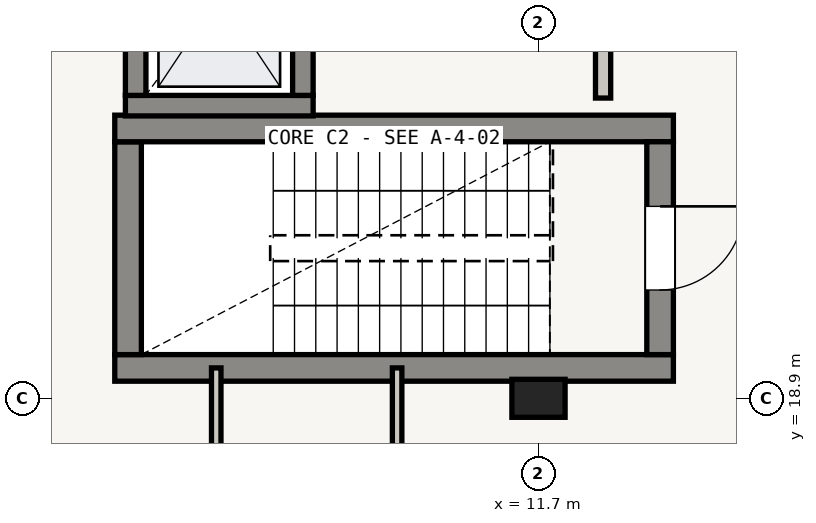
"""IFC4 building model, lengths in metres.
Left out: names, types, materials, properties, quantities, classifications, styles, units other than length and angle.
Written with IfcOpenShell. Run it as: python <this file> out.ifc"""

import sys

from ifc_helpers import new_model, si_unit, direction, frame, frame_2d, origin, origin_2d, place, context, subcontext, project, spatial, rectangle, extrude, element, fill, save


model = new_model("IFC4")
c1 = context("Model", 3, precision=1e-05, world=origin(), true_north=direction((0.0, 1.0)))
c2 = subcontext(c1, "Body", "Model", "MODEL_VIEW")
j1 = project(units=[si_unit("LENGTHUNIT", "METRE"), si_unit("PLANEANGLEUNIT", "RADIAN")], contexts=[c1])
p1 = place(None, origin())
s1 = spatial("IfcSite", under=j1, at=p1, CompositionType="ELEMENT")
p2 = place(p1, origin())
s2 = spatial("IfcBuilding", under=s1, at=p2, CompositionType="ELEMENT")
p3 = place(p2, frame((0.0, 0.0, 17.1)))
s3 = spatial("IfcBuildingStorey", under=s2, at=p3, CompositionType="ELEMENT", Elevation=17.1)
p4 = place(p3, frame((11.7, 18.9, 0.0), z_axis=(0.0, 0.0, 1.0), x_axis=(1.0, 0.0, 0.0)))
e1 = element("IfcColumn", 1, at=p4, inside=s3, PredefinedType="COLUMN", context=c2, shape_type="SweptSolid", body=[
    extrude(rectangle(XDim=0.7, YDim=0.5, at=origin_2d()), origin(), (0.0, 0.0, 1.0), 3.77),
])
p5 = place(p3, frame((13.475, 19.3, 0.0), z_axis=(0.0, 0.0, 1.0), x_axis=(-1.0, 0.0, 0.0)))
e2 = element("IfcWall", 2, at=p5, inside=s3, PredefinedType="SHEAR", context=c2, shape_type="SweptSolid", body=[
    extrude(rectangle(XDim=7.35, YDim=0.35, at=frame_2d((3.675, 0.0))), origin(), (0.0, 0.0, 1.0), 3.77),
])
p6 = place(p3, frame((6.3, 19.475, 0.0), z_axis=(0.0, 0.0, 1.0), x_axis=(0.0, 1.0, 0.0)))
e3 = element("IfcWall", 3, at=p6, inside=s3, PredefinedType="SHEAR", context=c2, shape_type="SweptSolid", body=[
    extrude(rectangle(XDim=2.8, YDim=0.35, at=frame_2d((1.4, 0.0))), origin(), (0.0, 0.0, 1.0), 3.77),
])
p7 = place(p3, frame((6.125, 22.45, 0.0), z_axis=(0.0, 0.0, 1.0), x_axis=(1.0, 0.0, 0.0)))
e4 = element("IfcWall", 4, at=p7, inside=s3, PredefinedType="SHEAR", context=c2, shape_type="SweptSolid", body=[
    extrude(rectangle(XDim=7.35, YDim=0.35, at=frame_2d((3.675, 0.0))), origin(), (0.0, 0.0, 1.0), 3.77),
])
p8 = place(p3, frame((13.3, 22.275, 0.0), z_axis=(0.0, 0.0, 1.0), x_axis=(0.0, -1.0, 0.0)))
e5 = element("IfcWall", 5, at=p8, inside=s3, PredefinedType="SHEAR", context=c2, shape_type="SweptSolid", body=[
    extrude(rectangle(XDim=2.8, YDim=0.35, at=frame_2d((1.4, 0.0))), origin(), (0.0, 0.0, 1.0), 3.77),
])
p9 = place(p8, frame((0.85, 0.0, 0.0)))
e6 = element("IfcOpeningElement", 6, at=p9, cuts=e5, PredefinedType="OPENING", context=c2, shape_type="SweptSolid", body=[
    extrude(rectangle(XDim=1.1, YDim=2.05, at=frame_2d((0.55, 1.025))), frame((0.0, 0.175, 0.0), z_axis=(0.0, -1.0, 0.0), x_axis=(1.0, 0.0, 0.0)), (0.0, 0.0, 1.0), 0.35),
])
p10 = place(p3, frame((8.735, 22.75, 0.0), z_axis=(0.0, 0.0, 1.0), x_axis=(-1.0, 0.0, 0.0)))
e7 = element("IfcWall", 7, at=p10, inside=s3, PredefinedType="SHEAR", context=c2, shape_type="SweptSolid", body=[
    extrude(rectangle(XDim=2.47, YDim=0.27, at=frame_2d((1.235, 0.0))), origin(), (0.0, 0.0, 1.0), 3.77),
])
p11 = place(p3, frame((6.4, 22.885, 0.0), z_axis=(0.0, 0.0, 1.0), x_axis=(0.0, 1.0, 0.0)))
e8 = element("IfcWall", 8, at=p11, inside=s3, PredefinedType="SHEAR", context=c2, shape_type="SweptSolid", body=[
    extrude(rectangle(XDim=2.63, YDim=0.27, at=frame_2d((1.315, 0.0))), origin(), (0.0, 0.0, 1.0), 3.77),
])
p12 = place(p3, frame((8.6, 25.515, 0.0), z_axis=(0.0, 0.0, 1.0), x_axis=(0.0, -1.0, 0.0)))
e9 = element("IfcWall", 9, at=p12, inside=s3, PredefinedType="SHEAR", context=c2, shape_type="SweptSolid", body=[
    extrude(rectangle(XDim=2.63, YDim=0.27, at=frame_2d((1.315, 0.0))), origin(), (0.0, 0.0, 1.0), 3.77),
])
p13 = place(p12, frame((0.755, 0.0, 0.0)))
e10 = element("IfcOpeningElement", 10, at=p13, cuts=e9, PredefinedType="OPENING", context=c2, shape_type="SweptSolid", body=[
    extrude(rectangle(XDim=1.12, YDim=2.1, at=frame_2d((0.56, 1.05))), frame((0.0, 0.135, 0.0), z_axis=(0.0, -1.0, 0.0), x_axis=(1.0, 0.0, 0.0)), (0.0, 0.0, 1.0), 0.27),
])
p14 = place(p3, frame((12.55, 25.75, 0.0), z_axis=(0.0, 0.0, 1.0), x_axis=(0.0, -1.0, 0.0)))
e11 = element("IfcWall", 11, at=p14, inside=s3, PredefinedType="SOLIDWALL", context=c2, shape_type="SweptSolid", body=[
    extrude(rectangle(XDim=2.9, YDim=0.2, at=frame_2d((1.45, 0.0))), origin(), (0.0, 0.0, 1.0), 2.79),
])
p15 = place(p14, frame((0.875, 0.0, 0.0)))
e12 = element("IfcOpeningElement", 12, at=p15, cuts=e11, PredefinedType="OPENING", context=c2, shape_type="SweptSolid", body=[
    extrude(rectangle(XDim=1.15, YDim=2.05, at=frame_2d((0.575, 1.025))), frame((0.0, 0.1, 0.0), z_axis=(0.0, -1.0, 0.0), x_axis=(1.0, 0.0, 0.0)), (0.0, 0.0, 1.0), 0.2),
])
for number, where, z_axis, x_axis in (
    (13, (9.84, 15.92, 0.0), (0.0, 0.0, 1.0), (0.0, 1.0, 0.0)),
    (14, (7.46, 19.3, 0.0), (0.0, 0.0, 1.0), (0.0, -1.0, 0.0)),
):
    element("IfcWall", number, at=place(p3, frame(where, z_axis=z_axis, x_axis=x_axis)), inside=s3, PredefinedType="PARTITIONING", context=c2, shape_type="SweptSolid", body=[
        extrude(rectangle(XDim=3.38, YDim=0.125, at=frame_2d((1.69, 0.0))), origin(), (0.0, 0.0, 1.0), 2.79),
    ])
p16 = place(p9, origin())
e15 = element("IfcDoor", 15, at=p16, inside=s3, OperationType="SINGLE_SWING_LEFT", PredefinedType="DOOR", context=c2, shape_type="SweptSolid", body=[
    extrude(rectangle(XDim=1.1, YDim=2.05, at=frame_2d((0.55, 1.025))), frame((0.0, 0.025, 0.0), z_axis=(0.0, -1.0, 0.0), x_axis=(1.0, 0.0, 0.0)), (0.0, 0.0, 1.0), 0.05),
])
fill(e6, e15)
save(model, sys.argv[1])
